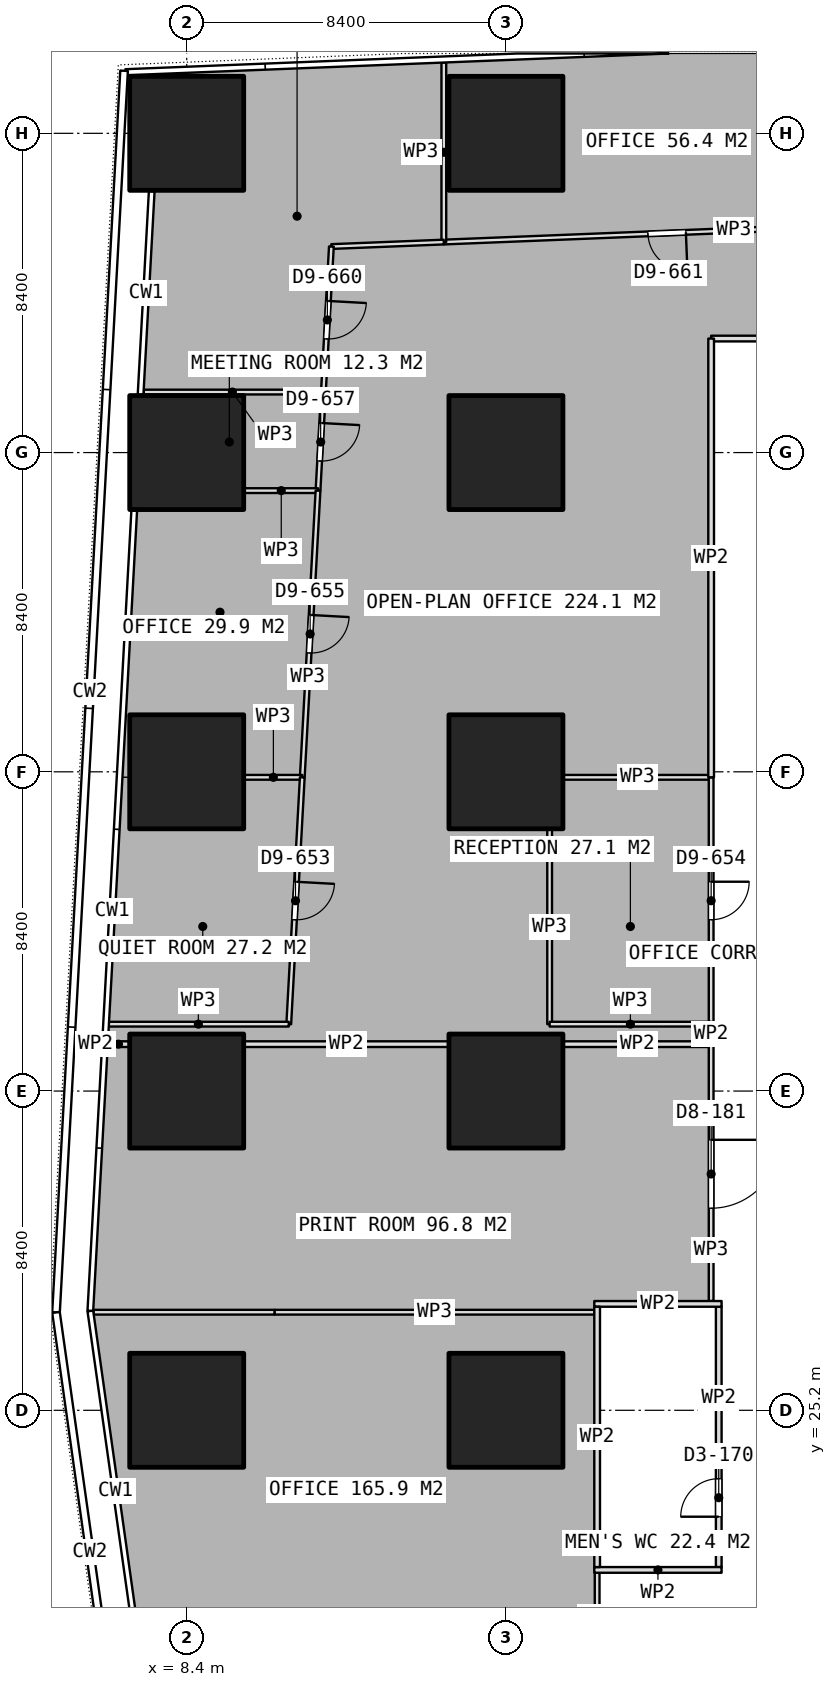
"""IFC4 building model, lengths in metres.
Left out: names, types, materials, properties, quantities, classifications, styles, units other than length and angle.
Written with IfcOpenShell. Run it as: python <this file> out.ifc"""

import sys

from ifc_helpers import new_model, si_unit, direction, frame, frame_2d, origin, origin_2d, place, context, subcontext, project, spatial, rectangle, extrude, element, fill, save


model = new_model("IFC4")
c1 = context("Model", 3, precision=1e-05, world=origin(), true_north=direction((0.0, 1.0)))
c2 = subcontext(c1, "Body", "Model", "MODEL_VIEW")
j1 = project(units=[si_unit("LENGTHUNIT", "METRE"), si_unit("PLANEANGLEUNIT", "RADIAN")], contexts=[c1])
p1 = place(None, origin())
s1 = spatial("IfcSite", under=j1, at=p1, CompositionType="ELEMENT")
p2 = place(p1, origin())
s2 = spatial("IfcBuilding", under=s1, at=p2, CompositionType="ELEMENT")
p3 = place(p2, frame((0.0, 0.0, 159.05)))
s3 = spatial("IfcBuildingStorey", under=s2, at=p3, CompositionType="ELEMENT", Elevation=159.05)
for number, where, z_axis, x_axis in (
    (1, (8.4, 25.2, 0.0), (0.0, 0.0, 1.0), (1.0, 0.0, 0.0)),
    (2, (8.4, 33.6, 0.0), (0.0, 0.0, 1.0), (1.0, 0.0, 0.0)),
    (3, (8.4, 42.0, 0.0), (0.0, 0.0, 1.0), (1.0, 0.0, 0.0)),
    (4, (8.4, 50.4, 0.0), (0.0, 0.0, 1.0), (1.0, 0.0, 0.0)),
    (5, (8.4, 58.8, 0.0), (0.0, 0.0, 1.0), (1.0, 0.0, 0.0)),
    (6, (16.8, 25.2, 0.0), (0.0, 0.0, 1.0), (1.0, 0.0, 0.0)),
    (7, (16.8, 33.6, 0.0), (0.0, 0.0, 1.0), (1.0, 0.0, 0.0)),
    (8, (16.8, 42.0, 0.0), (0.0, 0.0, 1.0), (1.0, 0.0, 0.0)),
    (9, (16.8, 50.4, 0.0), (0.0, 0.0, 1.0), (1.0, 0.0, 0.0)),
    (10, (16.8, 58.8, 0.0), (0.0, 0.0, 1.0), (1.0, 0.0, 0.0)),
):
    element("IfcColumn", number, at=place(p3, frame(where, z_axis=z_axis, x_axis=x_axis)), inside=s3, PredefinedType="COLUMN", context=c2, shape_type="SweptSolid", body=[
        extrude(rectangle(XDim=3.0, YDim=3.0, at=origin_2d()), origin(), (0.0, 0.0, 1.0), 3.75),
    ])
for number, where, z_axis, x_axis in (
    (11, (19.125, 21.0, 0.0), (0.0, 0.0, 1.0), (1.0, 0.0, 0.0)),
    (12, (19.125, 28.0, 0.0), (0.0, 0.0, 1.0), (1.0, 0.0, 0.0)),
):
    element("IfcWall", number, at=place(p3, frame(where, z_axis=z_axis, x_axis=x_axis)), inside=s3, PredefinedType="PARTITIONING", context=c2, shape_type="SweptSolid", body=[
        extrude(rectangle(XDim=3.35, YDim=0.15, at=frame_2d((1.675, 0.0))), origin(), (0.0, 0.0, 1.0), 3.4),
    ])
p4 = place(p3, frame((19.2, 21.075, 0.0), z_axis=(0.0, 0.0, 1.0), x_axis=(0.0, 1.0, 0.0)))
e13 = element("IfcWall", 13, at=p4, inside=s3, PredefinedType="PARTITIONING", context=c2, shape_type="SweptSolid", body=[
    extrude(rectangle(XDim=6.85, YDim=0.15, at=frame_2d((3.425, 0.0))), origin(), (0.0, 0.0, 1.0), 3.4),
])
p5 = place(p3, frame((22.4, 21.075, 0.0), z_axis=(0.0, 0.0, 1.0), x_axis=(0.0, 1.0, 0.0)))
e14 = element("IfcWall", 14, at=p5, inside=s3, PredefinedType="PARTITIONING", context=c2, shape_type="SweptSolid", body=[
    extrude(rectangle(XDim=6.85, YDim=0.15, at=frame_2d((3.425, 0.0))), origin(), (0.0, 0.0, 1.0), 3.4),
])
p6 = place(p5, frame((1.325, 0.0, 0.0)))
e15 = element("IfcOpeningElement", 15, at=p6, cuts=e14, PredefinedType="OPENING", context=c2, shape_type="SweptSolid", body=[
    extrude(rectangle(XDim=1.0, YDim=2.1, at=frame_2d((0.5, 1.05))), frame((0.0, 0.085, 0.0), z_axis=(0.0, -1.0, 0.0), x_axis=(1.0, 0.0, 0.0)), (0.0, 0.0, 1.0), 0.17),
])
p7 = place(p3, frame((26.906, 56.41, 0.0), z_axis=(0.0, 0.0, 1.0), x_axis=(-0.999196371501, -0.04008255455, 0.0)))
e16 = element("IfcWall", 16, at=p7, inside=s3, PredefinedType="PARTITIONING", context=c2, shape_type="SweptSolid", body=[
    extrude(rectangle(XDim=11.75, YDim=0.125, at=frame_2d((5.875, 0.0))), origin(), (0.0, 0.0, 1.0), 3.4),
])
p8 = place(p7, frame((5.375, 0.0, 0.0)))
e17 = element("IfcOpeningElement", 17, at=p8, cuts=e16, PredefinedType="OPENING", context=c2, shape_type="SweptSolid", body=[
    extrude(rectangle(XDim=1.0, YDim=2.1, at=frame_2d((0.5, 1.05))), frame((0.0, 0.073, 0.0), z_axis=(0.0, -1.0, 0.0), x_axis=(1.0, 0.0, 0.0)), (0.0, 0.0, 1.0), 0.145),
])
p9 = place(p3, frame((15.166, 55.939, 0.0), z_axis=(0.0, 0.0, 1.0), x_axis=(0.0, 1.0, 0.0)))
e18 = element("IfcWall", 18, at=p9, inside=s3, PredefinedType="PARTITIONING", context=c2, shape_type="SweptSolid", body=[
    extrude(rectangle(XDim=4.724, YDim=0.125, at=frame_2d((2.362, 0.0))), origin(), (0.0, 0.0, 1.0), 3.4),
])
p10 = place(p3, frame((15.165, 55.939, 0.0), z_axis=(0.0, 0.0, 1.0), x_axis=(-0.999206350986, -0.039833003262, 0.0)))
e19 = element("IfcWall", 19, at=p10, inside=s3, PredefinedType="PARTITIONING", context=c2, shape_type="SweptSolid", body=[
    extrude(rectangle(XDim=2.96, YDim=0.125, at=frame_2d((1.48, 0.0))), origin(), (0.0, 0.0, 1.0), 3.4),
])
p11 = place(p3, frame((12.207, 55.821, 0.0), z_axis=(0.0, 0.0, 1.0), x_axis=(-0.054774500105, -0.998498750194, 0.0)))
e20 = element("IfcWall", 20, at=p11, inside=s3, PredefinedType="PARTITIONING", context=c2, shape_type="SweptSolid", body=[
    extrude(rectangle(XDim=3.869, YDim=0.125, at=frame_2d((1.935, 0.0))), origin(), (0.0, 0.0, 1.0), 3.4),
])
p12 = place(p11, frame((1.434, 0.0, 0.0)))
e21 = element("IfcOpeningElement", 21, at=p12, cuts=e20, PredefinedType="OPENING", context=c2, shape_type="SweptSolid", body=[
    extrude(rectangle(XDim=1.0, YDim=2.1, at=frame_2d((0.5, 1.05))), frame((0.0, 0.073, 0.0), z_axis=(0.0, -1.0, 0.0), x_axis=(1.0, 0.0, 0.0)), (0.0, 0.0, 1.0), 0.145),
])
p13 = place(p3, frame((11.934, 51.992, 0.0), z_axis=(0.0, 0.0, 1.0), x_axis=(-1.0, 0.0, 0.0)))
e22 = element("IfcWall", 22, at=p13, inside=s3, PredefinedType="PARTITIONING", context=c2, shape_type="SweptSolid", body=[
    extrude(rectangle(XDim=4.664, YDim=0.125, at=frame_2d((2.332, 0.0))), origin(), (0.0, 0.0, 1.0), 3.4),
])
p14 = place(p3, frame((11.995, 51.957, 0.0), z_axis=(0.0, 0.0, 1.0), x_axis=(-0.054699431641, -0.998502865383, 0.0)))
e23 = element("IfcWall", 23, at=p14, inside=s3, PredefinedType="PARTITIONING", context=c2, shape_type="SweptSolid", body=[
    extrude(rectangle(XDim=2.562, YDim=0.125, at=frame_2d((1.281, 0.0))), origin(), (0.0, 0.0, 1.0), 3.4),
])
p15 = place(p14, frame((0.781, 0.0, 0.0)))
e24 = element("IfcOpeningElement", 24, at=p15, cuts=e23, PredefinedType="OPENING", context=c2, shape_type="SweptSolid", body=[
    extrude(rectangle(XDim=1.0, YDim=2.1, at=frame_2d((0.5, 1.05))), frame((0.0, 0.073, 0.0), z_axis=(0.0, -1.0, 0.0), x_axis=(1.0, 0.0, 0.0)), (0.0, 0.0, 1.0), 0.145),
])
p16 = place(p3, frame((11.855, 49.399, 0.0), z_axis=(0.0, 0.0, 1.0), x_axis=(-1.0, 0.0, 0.0)))
e25 = element("IfcWall", 25, at=p16, inside=s3, PredefinedType="PARTITIONING", context=c2, shape_type="SweptSolid", body=[
    extrude(rectangle(XDim=1.935, YDim=0.125, at=frame_2d((0.968, 0.0))), origin(), (0.0, 0.0, 1.0), 3.4),
])
p17 = place(p3, frame((11.855, 49.398, 0.0), z_axis=(0.0, 0.0, 1.0), x_axis=(-0.054811317123, -0.998496729847, 0.0)))
e26 = element("IfcWall", 26, at=p17, inside=s3, PredefinedType="PARTITIONING", context=c2, shape_type="SweptSolid", body=[
    extrude(rectangle(XDim=7.554, YDim=0.125, at=frame_2d((3.777, 0.0))), origin(), (0.0, 0.0, 1.0), 3.4),
])
p18 = place(p17, frame((3.277, 0.0, 0.0)))
e27 = element("IfcOpeningElement", 27, at=p18, cuts=e26, PredefinedType="OPENING", context=c2, shape_type="SweptSolid", body=[
    extrude(rectangle(XDim=1.0, YDim=2.1, at=frame_2d((0.5, 1.05))), frame((0.0, 0.073, 0.0), z_axis=(0.0, -1.0, 0.0), x_axis=(1.0, 0.0, 0.0)), (0.0, 0.0, 1.0), 0.145),
])
p19 = place(p3, frame((11.441, 41.855, 0.0), z_axis=(0.0, 0.0, 1.0), x_axis=(-1.0, 0.0, 0.0)))
e28 = element("IfcWall", 28, at=p19, inside=s3, PredefinedType="PARTITIONING", context=c2, shape_type="SweptSolid", body=[
    extrude(rectangle(XDim=1.521, YDim=0.125, at=frame_2d((0.76, 0.0))), origin(), (0.0, 0.0, 1.0), 3.4),
])
p20 = place(p3, frame((11.441, 41.854, 0.0), z_axis=(0.0, 0.0, 1.0), x_axis=(-0.05473192907, -0.998501084596, 0.0)))
e29 = element("IfcWall", 29, at=p20, inside=s3, PredefinedType="PARTITIONING", context=c2, shape_type="SweptSolid", body=[
    extrude(rectangle(XDim=6.504, YDim=0.125, at=frame_2d((3.252, 0.0))), origin(), (0.0, 0.0, 1.0), 3.4),
])
p21 = place(p20, frame((2.752, 0.0, 0.0)))
e30 = element("IfcOpeningElement", 30, at=p21, cuts=e29, PredefinedType="OPENING", context=c2, shape_type="SweptSolid", body=[
    extrude(rectangle(XDim=1.0, YDim=2.1, at=frame_2d((0.5, 1.05))), frame((0.0, 0.073, 0.0), z_axis=(0.0, -1.0, 0.0), x_axis=(1.0, 0.0, 0.0)), (0.0, 0.0, 1.0), 0.145),
])
p22 = place(p3, frame((11.085, 35.36, 0.0), z_axis=(0.0, 0.0, 1.0), x_axis=(-1.0, 0.0, 0.0)))
e31 = element("IfcWall", 31, at=p22, inside=s3, PredefinedType="PARTITIONING", context=c2, shape_type="SweptSolid", body=[
    extrude(rectangle(XDim=4.757, YDim=0.125, at=frame_2d((2.378, 0.0))), origin(), (0.0, 0.0, 1.0), 3.4),
])
p23 = place(p3, frame((17.95, 35.36, 0.0), z_axis=(0.0, 0.0, 1.0), x_axis=(0.0, 1.0, 0.0)))
e32 = element("IfcWall", 32, at=p23, inside=s3, PredefinedType="PARTITIONING", context=c2, shape_type="SweptSolid", body=[
    extrude(rectangle(XDim=5.12, YDim=0.125, at=frame_2d((2.56, 0.0))), origin(), (0.0, 0.0, 1.0), 3.4),
])
p24 = place(p3, frame((18.32, 41.855, 0.0), z_axis=(0.0, 0.0, 1.0), x_axis=(1.0, 0.0, 0.0)))
e33 = element("IfcWall", 33, at=p24, inside=s3, PredefinedType="PARTITIONING", context=c2, shape_type="SweptSolid", body=[
    extrude(rectangle(XDim=3.88, YDim=0.125, at=frame_2d((1.94, 0.0))), origin(), (0.0, 0.0, 1.0), 3.4),
])
p25 = place(p3, frame((22.2, 41.855, 0.0), z_axis=(0.0, 0.0, 1.0), x_axis=(0.0, -1.0, 0.0)))
e34 = element("IfcWall", 34, at=p25, inside=s3, PredefinedType="PARTITIONING", context=c2, shape_type="SweptSolid", body=[
    extrude(rectangle(XDim=6.495, YDim=0.125, at=frame_2d((3.248, 0.0))), origin(), (0.0, 0.0, 1.0), 3.4),
])
p26 = place(p25, frame((2.747, 0.0, 0.0)))
e35 = element("IfcOpeningElement", 35, at=p26, cuts=e34, PredefinedType="OPENING", context=c2, shape_type="SweptSolid", body=[
    extrude(rectangle(XDim=1.0, YDim=2.1, at=frame_2d((0.5, 1.05))), frame((0.0, 0.073, 0.0), z_axis=(0.0, -1.0, 0.0), x_axis=(1.0, 0.0, 0.0)), (0.0, 0.0, 1.0), 0.145),
])
p27 = place(p3, frame((22.2, 35.36, 0.0), z_axis=(0.0, 0.0, 1.0), x_axis=(-1.0, 0.0, 0.0)))
e36 = element("IfcWall", 36, at=p27, inside=s3, PredefinedType="PARTITIONING", context=c2, shape_type="SweptSolid", body=[
    extrude(rectangle(XDim=4.25, YDim=0.125, at=frame_2d((2.125, 0.0))), origin(), (0.0, 0.0, 1.0), 3.4),
])
p28 = place(p3, frame((33.826, 53.4, 0.0), z_axis=(0.0, 0.0, 1.0), x_axis=(-1.0, 0.0, 0.0)))
e37 = element("IfcWall", 37, at=p28, inside=s3, PredefinedType="PARTITIONING", context=c2, shape_type="SweptSolid", body=[
    extrude(rectangle(XDim=11.626, YDim=0.15, at=frame_2d((5.813, 0.0))), origin(), (0.0, 0.0, 1.0), 3.4),
])
p29 = place(p28, frame((5.313, 0.0, 0.0)))
e38 = element("IfcOpeningElement", 38, at=p29, cuts=e37, PredefinedType="OPENING", context=c2, shape_type="SweptSolid", body=[
    extrude(rectangle(XDim=1.0, YDim=2.1, at=frame_2d((0.5, 1.05))), frame((0.0, 0.085, 0.0), z_axis=(0.0, -1.0, 0.0), x_axis=(1.0, 0.0, 0.0)), (0.0, 0.0, 1.0), 0.17),
])
p30 = place(p3, frame((22.2, 53.4, 0.0), z_axis=(0.0, 0.0, 1.0), x_axis=(0.0, -1.0, 0.0)))
e39 = element("IfcWall", 39, at=p30, inside=s3, PredefinedType="PARTITIONING", context=c2, shape_type="SweptSolid", body=[
    extrude(rectangle(XDim=11.545, YDim=0.15, at=frame_2d((5.772, 0.0))), origin(), (0.0, 0.0, 1.0), 3.4),
])
p31 = place(p3, frame((22.2, 35.36, 0.0), z_axis=(0.0, 0.0, 1.0), x_axis=(0.0, -1.0, 0.0)))
e40 = element("IfcWall", 40, at=p31, inside=s3, PredefinedType="PARTITIONING", context=c2, shape_type="SweptSolid", body=[
    extrude(rectangle(XDim=0.526, YDim=0.15, at=frame_2d((0.263, 0.0))), origin(), (0.0, 0.0, 1.0), 3.4),
])
p32 = place(p3, frame((22.2, 34.834, 0.0), z_axis=(0.0, 0.0, 1.0), x_axis=(-1.0, 0.0, 0.0)))
e41 = element("IfcWall", 41, at=p32, inside=s3, PredefinedType="PARTITIONING", context=c2, shape_type="SweptSolid", body=[
    extrude(rectangle(XDim=3.88, YDim=0.15, at=frame_2d((1.94, 0.0))), origin(), (0.0, 0.0, 1.0), 3.4),
])
p33 = place(p3, frame((15.28, 34.834, 0.0), z_axis=(0.0, 0.0, 1.0), x_axis=(-1.0, 0.0, 0.0)))
e42 = element("IfcWall", 42, at=p33, inside=s3, PredefinedType="PARTITIONING", context=c2, shape_type="SweptSolid", body=[
    extrude(rectangle(XDim=5.36, YDim=0.15, at=frame_2d((2.68, 0.0))), origin(), (0.0, 0.0, 1.0), 3.4),
])
p34 = place(p3, frame((6.88, 34.834, 0.0), z_axis=(0.0, 0.0, 1.0), x_axis=(-1.0, 0.0, 0.0)))
e43 = element("IfcWall", 43, at=p34, inside=s3, PredefinedType="PARTITIONING", context=c2, shape_type="SweptSolid", body=[
    extrude(rectangle(XDim=0.551, YDim=0.15, at=frame_2d((0.275, 0.0))), origin(), (0.0, 0.0, 1.0), 3.4),
])
p35 = place(p3, frame((5.949, 27.781, 0.0), z_axis=(0.0, 0.0, 1.0), x_axis=(1.0, 0.0, 0.0)))
e44 = element("IfcWall", 44, at=p35, inside=s3, PredefinedType="PARTITIONING", context=c2, shape_type="SweptSolid", body=[
    extrude(rectangle(XDim=4.767, YDim=0.125, at=frame_2d((2.384, 0.0))), origin(), (0.0, 0.0, 1.0), 3.4),
])
p36 = place(p3, frame((10.716, 27.781, 0.0), z_axis=(0.0, 0.0, 1.0), x_axis=(1.0, 0.0, 0.0)))
e45 = element("IfcWall", 45, at=p36, inside=s3, PredefinedType="PARTITIONING", context=c2, shape_type="SweptSolid", body=[
    extrude(rectangle(XDim=8.409, YDim=0.125, at=frame_2d((4.205, 0.0))), origin(), (0.0, 0.0, 1.0), 3.4),
])
p37 = place(p3, frame((19.2, 21.075, 0.0), z_axis=(0.0, 0.0, 1.0), x_axis=(0.0, -1.0, 0.0)))
e46 = element("IfcWall", 46, at=p37, inside=s3, PredefinedType="PARTITIONING", context=c2, shape_type="SweptSolid", body=[
    extrude(rectangle(XDim=2.625, YDim=0.125, at=frame_2d((1.312, 0.0))), origin(), (0.0, 0.0, 1.0), 3.4),
])
p38 = place(p3, frame((22.2, 34.834, 0.0), z_axis=(0.0, 0.0, 1.0), x_axis=(0.0, -1.0, 0.0)))
e47 = element("IfcWall", 47, at=p38, inside=s3, PredefinedType="PARTITIONING", context=c2, shape_type="SweptSolid", body=[
    extrude(rectangle(XDim=6.759, YDim=0.125, at=frame_2d((3.379, 0.0))), origin(), (0.0, 0.0, 1.0), 3.4),
])
p39 = place(p38, frame((2.517, 0.0, 0.0)))
e48 = element("IfcOpeningElement", 48, at=p39, cuts=e47, PredefinedType="OPENING", context=c2, shape_type="SweptSolid", body=[
    extrude(rectangle(XDim=1.8, YDim=2.1, at=frame_2d((0.9, 1.05))), frame((0.0, 0.073, 0.0), z_axis=(0.0, -1.0, 0.0), x_axis=(1.0, 0.0, 0.0)), (0.0, 0.0, 1.0), 0.145),
])
p40 = place(p6, origin())
e49 = element("IfcDoor", 49, at=p40, inside=s3, OperationType="SINGLE_SWING_LEFT", PredefinedType="DOOR", context=c2, shape_type="SweptSolid", body=[
    extrude(rectangle(XDim=1.0, YDim=2.1, at=frame_2d((0.5, 1.05))), frame((0.0, 0.025, 0.0), z_axis=(0.0, -1.0, 0.0), x_axis=(1.0, 0.0, 0.0)), (0.0, 0.0, 1.0), 0.05),
])
fill(e15, e49)
p41 = place(p8, origin())
e50 = element("IfcDoor", 50, at=p41, inside=s3, OperationType="SINGLE_SWING_LEFT", PredefinedType="DOOR", context=c2, shape_type="SweptSolid", body=[
    extrude(rectangle(XDim=1.0, YDim=2.1, at=frame_2d((0.5, 1.05))), frame((0.0, 0.025, 0.0), z_axis=(0.0, -1.0, 0.0), x_axis=(1.0, 0.0, 0.0)), (0.0, 0.0, 1.0), 0.05),
])
fill(e17, e50)
p42 = place(p12, origin())
e51 = element("IfcDoor", 51, at=p42, inside=s3, OperationType="SINGLE_SWING_LEFT", PredefinedType="DOOR", context=c2, shape_type="SweptSolid", body=[
    extrude(rectangle(XDim=1.0, YDim=2.1, at=frame_2d((0.5, 1.05))), frame((0.0, 0.025, 0.0), z_axis=(0.0, -1.0, 0.0), x_axis=(1.0, 0.0, 0.0)), (0.0, 0.0, 1.0), 0.05),
])
fill(e21, e51)
p43 = place(p15, origin())
e52 = element("IfcDoor", 52, at=p43, inside=s3, OperationType="SINGLE_SWING_LEFT", PredefinedType="DOOR", context=c2, shape_type="SweptSolid", body=[
    extrude(rectangle(XDim=1.0, YDim=2.1, at=frame_2d((0.5, 1.05))), frame((0.0, 0.025, 0.0), z_axis=(0.0, -1.0, 0.0), x_axis=(1.0, 0.0, 0.0)), (0.0, 0.0, 1.0), 0.05),
])
fill(e24, e52)
p44 = place(p18, origin())
e53 = element("IfcDoor", 53, at=p44, inside=s3, OperationType="SINGLE_SWING_LEFT", PredefinedType="DOOR", context=c2, shape_type="SweptSolid", body=[
    extrude(rectangle(XDim=1.0, YDim=2.1, at=frame_2d((0.5, 1.05))), frame((0.0, 0.025, 0.0), z_axis=(0.0, -1.0, 0.0), x_axis=(1.0, 0.0, 0.0)), (0.0, 0.0, 1.0), 0.05),
])
fill(e27, e53)
p45 = place(p21, origin())
e54 = element("IfcDoor", 54, at=p45, inside=s3, OperationType="SINGLE_SWING_LEFT", PredefinedType="DOOR", context=c2, shape_type="SweptSolid", body=[
    extrude(rectangle(XDim=1.0, YDim=2.1, at=frame_2d((0.5, 1.05))), frame((0.0, 0.025, 0.0), z_axis=(0.0, -1.0, 0.0), x_axis=(1.0, 0.0, 0.0)), (0.0, 0.0, 1.0), 0.05),
])
fill(e30, e54)
p46 = place(p26, origin())
e55 = element("IfcDoor", 55, at=p46, inside=s3, OperationType="SINGLE_SWING_LEFT", PredefinedType="DOOR", context=c2, shape_type="SweptSolid", body=[
    extrude(rectangle(XDim=1.0, YDim=2.1, at=frame_2d((0.5, 1.05))), frame((0.0, 0.025, 0.0), z_axis=(0.0, -1.0, 0.0), x_axis=(1.0, 0.0, 0.0)), (0.0, 0.0, 1.0), 0.05),
])
fill(e35, e55)
p47 = place(p39, origin())
e56 = element("IfcDoor", 56, at=p47, inside=s3, OperationType="DOUBLE_DOOR_SINGLE_SWING", PredefinedType="DOOR", context=c2, shape_type="SweptSolid", body=[
    extrude(rectangle(XDim=1.8, YDim=2.1, at=frame_2d((0.9, 1.05))), frame((0.0, 0.025, 0.0), z_axis=(0.0, -1.0, 0.0), x_axis=(1.0, 0.0, 0.0)), (0.0, 0.0, 1.0), 0.05),
])
fill(e48, e56)
save(model, sys.argv[1])
